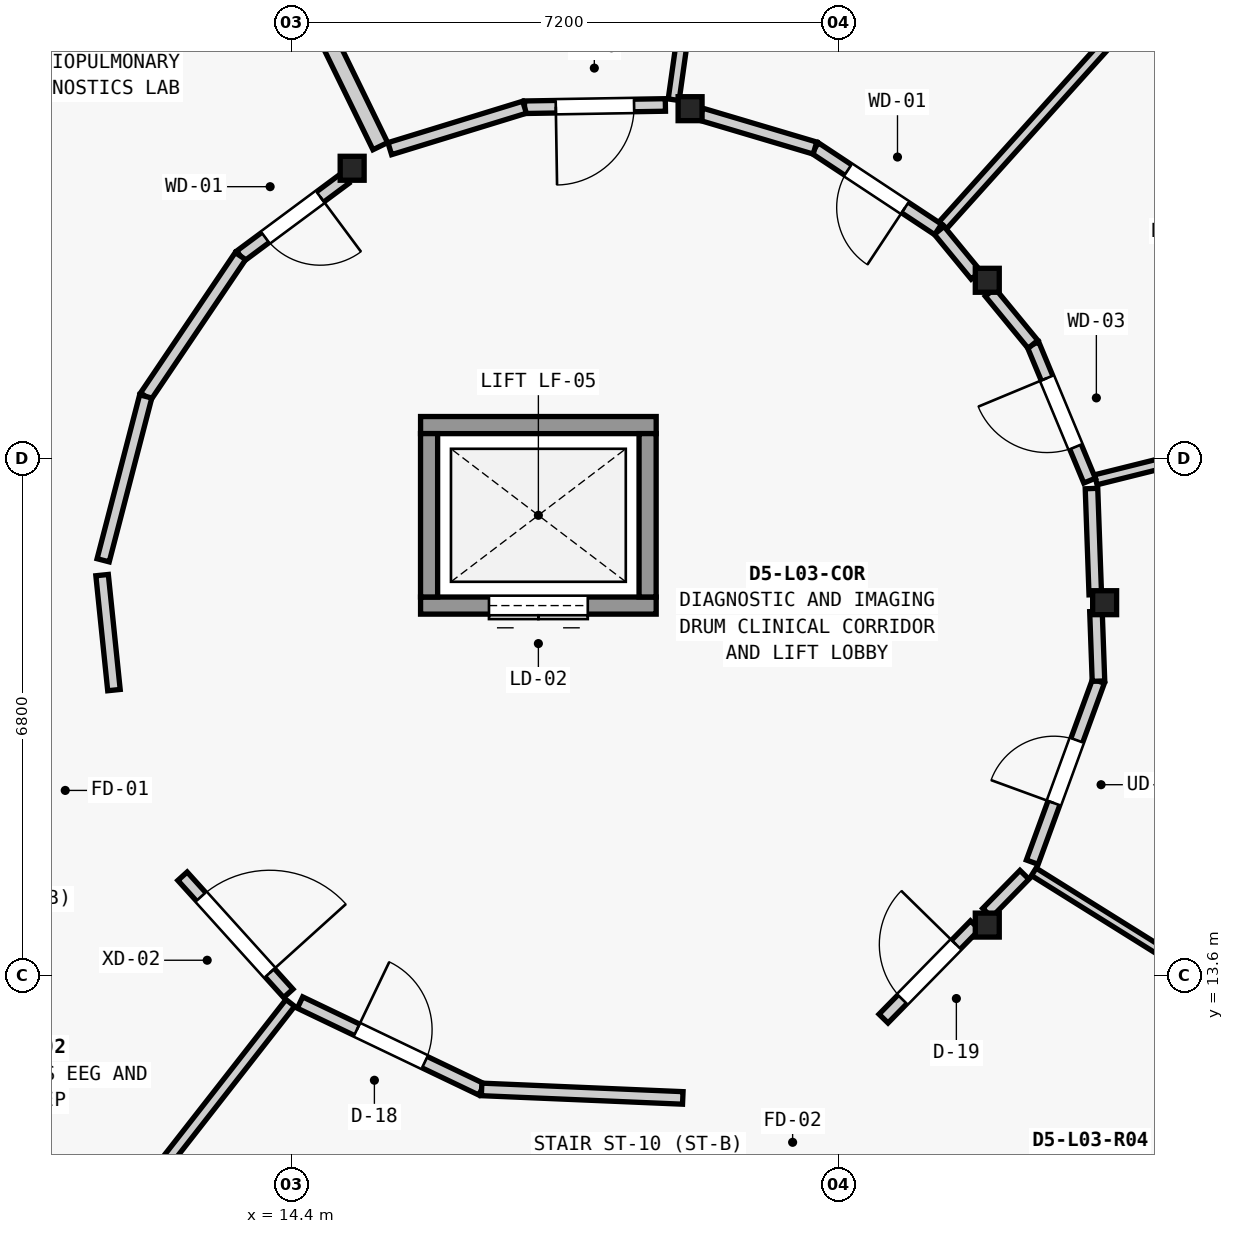
"""IFC4 building model, lengths in metres.
Left out: names, types, materials, properties, quantities, classifications, styles, units other than length and angle.
Written with IfcOpenShell. Run it as: python <this file> out.ifc"""

import sys

from ifc_helpers import new_model, si_unit, direction, frame, frame_2d, origin, origin_2d, place, context, subcontext, project, spatial, rectangle, extrude, element, fill, save


model = new_model("IFC4")
c1 = context("Model", 3, precision=1e-05, world=origin(), true_north=direction((0.0, 1.0)))
c2 = subcontext(c1, "Body", "Model", "MODEL_VIEW")
j1 = project(units=[si_unit("LENGTHUNIT", "METRE"), si_unit("PLANEANGLEUNIT", "RADIAN")], contexts=[c1])
p1 = place(None, origin())
s1 = spatial("IfcSite", under=j1, at=p1, CompositionType="ELEMENT")
p2 = place(p1, origin())
s2 = spatial("IfcBuilding", under=s1, at=p2, CompositionType="ELEMENT")
p3 = place(p2, frame((0.0, 0.0, 12.95)))
s3 = spatial("IfcBuildingStorey", under=s2, at=p3, CompositionType="ELEMENT", Elevation=12.95)
for number, where, z_axis, x_axis in (
    (1, (25.1, 18.5, 0.0), (0.0, 0.0, 1.0), (1.0, 0.0, 0.0)),
    (2, (23.556, 22.742, 0.0), (0.0, 0.0, 1.0), (1.0, 0.0, 0.0)),
    (3, (19.646, 25.0, 0.0), (0.0, 0.0, 1.0), (1.0, 0.0, 0.0)),
    (4, (15.2, 24.216, 0.0), (0.0, 0.0, 1.0), (1.0, 0.0, 0.0)),
    (5, (23.556, 14.258, 0.0), (0.0, 0.0, 1.0), (1.0, 0.0, 0.0)),
):
    element("IfcColumn", number, at=place(p3, frame(where, z_axis=z_axis, x_axis=x_axis)), inside=s3, PredefinedType="COLUMN", context=c2, shape_type="SweptSolid", body=[
        extrude(rectangle(XDim=0.315, YDim=0.315, at=origin_2d()), origin(), (0.0, 0.0, 1.0), 4.2),
    ])
p4 = place(p3, frame((16.1, 18.462, 0.0), z_axis=(0.0, 0.0, 1.0), x_axis=(1.0, 0.0, 0.0)))
e6 = element("IfcWall", 6, at=p4, inside=s3, PredefinedType="SHEAR", context=c2, shape_type="SweptSolid", body=[
    extrude(rectangle(XDim=3.1, YDim=0.225, at=frame_2d((1.55, 0.0))), origin(), (0.0, 0.0, 1.0), 3.995),
])
p5 = place(p4, frame((0.9, 0.0, 0.0)))
e7 = element("IfcOpeningElement", 7, at=p5, cuts=e6, PredefinedType="OPENING", context=c2, shape_type="SweptSolid", body=[
    extrude(rectangle(XDim=1.3, YDim=2.2, at=frame_2d((0.65, 1.1))), frame((0.0, 0.123, 0.0), z_axis=(0.0, -1.0, 0.0), x_axis=(1.0, 0.0, 0.0)), (0.0, 0.0, 1.0), 0.245),
])
p6 = place(p3, frame((16.1, 20.837, 0.0), z_axis=(0.0, 0.0, 1.0), x_axis=(1.0, 0.0, 0.0)))
e8 = element("IfcWall", 8, at=p6, inside=s3, PredefinedType="SHEAR", context=c2, shape_type="SweptSolid", body=[
    extrude(rectangle(XDim=3.1, YDim=0.225, at=frame_2d((1.55, 0.0))), origin(), (0.0, 0.0, 1.0), 3.995),
])
for number, where, z_axis, x_axis in (
    (9, (16.212, 18.575, 0.0), (0.0, 0.0, 1.0), (0.0, 1.0, 0.0)),
    (10, (19.087, 18.575, 0.0), (0.0, 0.0, 1.0), (0.0, 1.0, 0.0)),
):
    element("IfcWall", number, at=place(p3, frame(where, z_axis=z_axis, x_axis=x_axis)), inside=s3, PredefinedType="SHEAR", context=c2, shape_type="SweptSolid", body=[
        extrude(rectangle(XDim=2.15, YDim=0.225, at=frame_2d((1.075, 0.0))), origin(), (0.0, 0.0, 1.0), 3.995),
    ])
p7 = place(p3, frame((15.57, 24.507, 0.0), z_axis=(0.0, 0.0, 1.0), x_axis=(-0.438391683607, 0.898784029533, 0.0)))
e11 = element("IfcWall", 11, at=p7, inside=s3, PredefinedType="SOLIDWALL", context=c2, shape_type="SweptSolid", body=[
    extrude(rectangle(XDim=5.571, YDim=0.215, at=frame_2d((2.785, 0.0))), origin(), (0.0, 0.0, 1.0), 3.324),
])
p8 = place(p3, frame((14.386, 13.234, 0.0), z_axis=(0.0, 0.0, 1.0), x_axis=(-0.615754283542, -0.787938235079, 0.0)))
e12 = element("IfcWall", 12, at=p8, inside=s3, PredefinedType="PARTITIONING", context=c2, shape_type="SweptSolid", body=[
    extrude(rectangle(XDim=5.587, YDim=0.145, at=frame_2d((2.793, 0.0))), origin(), (0.0, 0.0, 1.0), 3.324),
])
p9 = place(p3, frame((24.168, 14.959, 0.0), z_axis=(0.0, 0.0, 1.0), x_axis=(0.847976206066, -0.530034295066, 0.0)))
e13 = element("IfcWall", 13, at=p9, inside=s3, PredefinedType="PARTITIONING", context=c2, shape_type="SweptSolid", body=[
    extrude(rectangle(XDim=5.586, YDim=0.115, at=frame_2d((2.793, 0.0))), origin(), (0.0, 0.0, 1.0), 3.324),
])
p10 = place(p3, frame((24.984, 20.117, 0.0), z_axis=(0.0, 0.0, 1.0), x_axis=(0.970325240459, 0.2418034899, 0.0)))
e14 = element("IfcWall", 14, at=p10, inside=s3, PredefinedType="PLUMBINGWALL", context=c2, shape_type="SweptSolid", body=[
    extrude(rectangle(XDim=5.571, YDim=0.135, at=frame_2d((2.786, 0.0))), origin(), (0.0, 0.0, 1.0), 3.324),
])
p11 = place(p3, frame((22.972, 23.466, 0.0), z_axis=(0.0, 0.0, 1.0), x_axis=(0.669003365604, 0.743259373846, 0.0)))
e15 = element("IfcWall", 15, at=p11, inside=s3, PredefinedType="PLUMBINGWALL", context=c2, shape_type="SweptSolid", body=[
    extrude(rectangle(XDim=5.586, YDim=0.135, at=frame_2d((2.793, 0.0))), origin(), (0.0, 0.0, 1.0), 3.324),
])
p12 = place(p3, frame((19.43, 25.118, 0.0), z_axis=(0.0, 0.0, 1.0), x_axis=(0.139279606871, 0.990253094471, 0.0)))
e16 = element("IfcWall", 16, at=p12, inside=s3, PredefinedType="PARTITIONING", context=c2, shape_type="SweptSolid", body=[
    extrude(rectangle(XDim=5.586, YDim=0.145, at=frame_2d((2.793, 0.0))), origin(), (0.0, 0.0, 1.0), 3.324),
])
p13 = place(p3, frame((15.107, 24.083, 0.0), z_axis=(0.0, 0.0, 1.0), x_axis=(-0.802996920627, -0.595983175487, 0.0)))
e17 = element("IfcWall", 17, at=p13, inside=s3, PredefinedType="PARTITIONING", context=c2, shape_type="SweptSolid", body=[
    extrude(rectangle(XDim=1.715, YDim=0.165, at=frame_2d((0.857, 0.0))), origin(), (0.0, 0.0, 1.0), 3.324),
])
p14 = place(p13, frame((0.407, 0.0, 0.0)))
e18 = element("IfcOpeningElement", 18, at=p14, cuts=e17, PredefinedType="OPENING", context=c2, shape_type="SweptSolid", body=[
    extrude(rectangle(XDim=0.9, YDim=2.1, at=frame_2d((0.45, 1.05))), frame((0.0, 0.093, 0.0), z_axis=(0.0, -1.0, 0.0), x_axis=(1.0, 0.0, 0.0)), (0.0, 0.0, 1.0), 0.185),
])
p15 = place(p3, frame((13.73, 23.061, 0.0), z_axis=(0.0, 0.0, 1.0), x_axis=(-0.559294051813, -0.828969338159, 0.0)))
e19 = element("IfcWall", 19, at=p15, inside=s3, PredefinedType="PARTITIONING", context=c2, shape_type="SweptSolid", body=[
    extrude(rectangle(XDim=2.228, YDim=0.165, at=frame_2d((1.114, 0.0))), origin(), (0.0, 0.0, 1.0), 3.324),
])
p16 = place(p3, frame((12.484, 21.214, 0.0), z_axis=(0.0, 0.0, 1.0), x_axis=(-0.251319689769, -0.967904134475, 0.0)))
e20 = element("IfcWall", 20, at=p16, inside=s3, PredefinedType="PARTITIONING", context=c2, shape_type="SweptSolid", body=[
    extrude(rectangle(XDim=2.228, YDim=0.165, at=frame_2d((1.114, 0.0))), origin(), (0.0, 0.0, 1.0), 3.324),
])
p17 = place(p3, frame((11.91, 18.863, 0.0), z_axis=(0.0, 0.0, 1.0), x_axis=(0.102570557108, -0.994725731453, 0.0)))
e21 = element("IfcWall", 21, at=p17, inside=s3, PredefinedType="PARTITIONING", context=c2, shape_type="SweptSolid", body=[
    extrude(rectangle(XDim=1.521, YDim=0.165, at=frame_2d((0.76, 0.0))), origin(), (0.0, 0.0, 1.0), 3.324),
])
p18 = place(p3, frame((12.968, 14.901, 0.0), z_axis=(0.0, 0.0, 1.0), x_axis=(0.670399039083, -0.742000760374, 0.0)))
e22 = element("IfcWall", 22, at=p18, inside=s3, PredefinedType="PARTITIONING", context=c2, shape_type="SweptSolid", body=[
    extrude(rectangle(XDim=2.076, YDim=0.165, at=frame_2d((1.038, 0.0))), origin(), (0.0, 0.0, 1.0), 3.324),
])
p19 = place(p18, frame((0.363, 0.0, 0.0)))
e23 = element("IfcOpeningElement", 23, at=p19, cuts=e22, PredefinedType="OPENING", context=c2, shape_type="SweptSolid", body=[
    extrude(rectangle(XDim=1.35, YDim=2.22, at=frame_2d((0.675, 1.11))), frame((0.0, 0.093, 0.0), z_axis=(0.0, -1.0, 0.0), x_axis=(1.0, 0.0, 0.0)), (0.0, 0.0, 1.0), 0.185),
])
p20 = place(p3, frame((14.514, 13.239, 0.0), z_axis=(0.0, 0.0, 1.0), x_axis=(0.902071813547, -0.431585962705, 0.0)))
e24 = element("IfcWall", 24, at=p20, inside=s3, PredefinedType="PARTITIONING", context=c2, shape_type="SweptSolid", body=[
    extrude(rectangle(XDim=2.648, YDim=0.165, at=frame_2d((1.324, 0.0))), origin(), (0.0, 0.0, 1.0), 3.324),
])
p21 = place(p20, frame((0.829, 0.0, 0.0)))
e25 = element("IfcOpeningElement", 25, at=p21, cuts=e24, PredefinedType="OPENING", context=c2, shape_type="SweptSolid", body=[
    extrude(rectangle(XDim=0.99, YDim=2.22, at=frame_2d((0.495, 1.11))), frame((0.0, 0.093, 0.0), z_axis=(0.0, -1.0, 0.0), x_axis=(1.0, 0.0, 0.0)), (0.0, 0.0, 1.0), 0.185),
])
p22 = place(p3, frame((16.903, 12.096, 0.0), z_axis=(0.0, 0.0, 1.0), x_axis=(0.99910506135, -0.042297474927, 0.0)))
e26 = element("IfcWall", 26, at=p22, inside=s3, PredefinedType="PARTITIONING", context=c2, shape_type="SweptSolid", body=[
    extrude(rectangle(XDim=2.649, YDim=0.165, at=frame_2d((1.325, 0.0))), origin(), (0.0, 0.0, 1.0), 3.324),
])
p23 = place(p3, frame((22.191, 13.028, 0.0), z_axis=(0.0, 0.0, 1.0), x_axis=(0.699827160014, 0.714312218926, 0.0)))
e27 = element("IfcWall", 27, at=p23, inside=s3, PredefinedType="PARTITIONING", context=c2, shape_type="SweptSolid", body=[
    extrude(rectangle(XDim=1.719, YDim=0.165, at=frame_2d((0.86, 0.0))), origin(), (0.0, 0.0, 1.0), 3.324),
])
p24 = place(p23, frame((0.354, 0.0, 0.0)))
e28 = element("IfcOpeningElement", 28, at=p24, cuts=e27, PredefinedType="OPENING", context=c2, shape_type="SweptSolid", body=[
    extrude(rectangle(XDim=1.01, YDim=2.15, at=frame_2d((0.505, 1.075))), frame((0.0, 0.093, 0.0), z_axis=(0.0, -1.0, 0.0), x_axis=(1.0, 0.0, 0.0)), (0.0, 0.0, 1.0), 0.185),
])
p25 = place(p3, frame((23.555, 14.42, 0.0), z_axis=(0.0, 0.0, 1.0), x_axis=(0.699921466631, 0.714219812487, 0.0)))
e29 = element("IfcWall", 29, at=p25, inside=s3, PredefinedType="PARTITIONING", context=c2, shape_type="SweptSolid", body=[
    extrude(rectangle(XDim=0.7, YDim=0.165, at=frame_2d((0.35, 0.0))), origin(), (0.0, 0.0, 1.0), 3.324),
])
p26 = place(p3, frame((24.148, 15.086, 0.0), z_axis=(0.0, 0.0, 1.0), x_axis=(0.343442799129, 0.939173596161, 0.0)))
e30 = element("IfcWall", 30, at=p26, inside=s3, PredefinedType="PARTITIONING", context=c2, shape_type="SweptSolid", body=[
    extrude(rectangle(XDim=2.536, YDim=0.165, at=frame_2d((1.268, 0.0))), origin(), (0.0, 0.0, 1.0), 3.324),
])
p27 = place(p26, frame((0.828, 0.0, 0.0)))
e31 = element("IfcOpeningElement", 31, at=p27, cuts=e30, PredefinedType="OPENING", context=c2, shape_type="SweptSolid", body=[
    extrude(rectangle(XDim=0.88, YDim=2.1, at=frame_2d((0.44, 1.05))), frame((0.0, 0.093, 0.0), z_axis=(0.0, -1.0, 0.0), x_axis=(1.0, 0.0, 0.0)), (0.0, 0.0, 1.0), 0.185),
])
p28 = place(p3, frame((25.019, 17.468, 0.0), z_axis=(0.0, 0.0, 1.0), x_axis=(-0.0359192981, 0.999354693802, 0.0)))
e32 = element("IfcWall", 32, at=p28, inside=s3, PredefinedType="PARTITIONING", context=c2, shape_type="SweptSolid", body=[
    extrude(rectangle(XDim=0.917, YDim=0.165, at=frame_2d((0.459, 0.0))), origin(), (0.0, 0.0, 1.0), 3.324),
])
p29 = place(p3, frame((24.977, 18.606, 0.0), z_axis=(0.0, 0.0, 1.0), x_axis=(-0.035828677701, 0.999357946811, 0.0)))
e33 = element("IfcWall", 33, at=p29, inside=s3, PredefinedType="PARTITIONING", context=c2, shape_type="SweptSolid", body=[
    extrude(rectangle(XDim=1.397, YDim=0.165, at=frame_2d((0.698, 0.0))), origin(), (0.0, 0.0, 1.0), 3.324),
])
p30 = place(p3, frame((24.902, 20.106, 0.0), z_axis=(0.0, 0.0, 1.0), x_axis=(-0.383758104383, 0.923433656155, 0.0)))
e34 = element("IfcWall", 34, at=p30, inside=s3, PredefinedType="PARTITIONING", context=c2, shape_type="SweptSolid", body=[
    extrude(rectangle(XDim=1.942, YDim=0.165, at=frame_2d((0.971, 0.0))), origin(), (0.0, 0.0, 1.0), 3.324),
])
p31 = place(p30, frame((0.481, 0.0, 0.0)))
e35 = element("IfcOpeningElement", 35, at=p31, cuts=e34, PredefinedType="OPENING", context=c2, shape_type="SweptSolid", body=[
    extrude(rectangle(XDim=0.98, YDim=2.1, at=frame_2d((0.49, 1.05))), frame((0.0, 0.093, 0.0), z_axis=(0.0, -1.0, 0.0), x_axis=(1.0, 0.0, 0.0)), (0.0, 0.0, 1.0), 0.185),
])
p32 = place(p3, frame((24.157, 21.899, 0.0), z_axis=(0.0, 0.0, 1.0), x_axis=(-0.634915552235, 0.772581543612, 0.0)))
e36 = element("IfcWall", 36, at=p32, inside=s3, PredefinedType="PARTITIONING", context=c2, shape_type="SweptSolid", body=[
    extrude(rectangle(XDim=0.887, YDim=0.165, at=frame_2d((0.443, 0.0))), origin(), (0.0, 0.0, 1.0), 3.324),
])
p33 = place(p3, frame((23.408, 22.809, 0.0), z_axis=(0.0, 0.0, 1.0), x_axis=(-0.635012128366, 0.772502166229, 0.0)))
e37 = element("IfcWall", 37, at=p33, inside=s3, PredefinedType="PARTITIONING", context=c2, shape_type="SweptSolid", body=[
    extrude(rectangle(XDim=0.763, YDim=0.165, at=frame_2d((0.382, 0.0))), origin(), (0.0, 0.0, 1.0), 3.324),
])
p34 = place(p3, frame((22.909, 23.411, 0.0), z_axis=(0.0, 0.0, 1.0), x_axis=(-0.834152513301, 0.551533847152, 0.0)))
e38 = element("IfcWall", 38, at=p34, inside=s3, PredefinedType="PARTITIONING", context=c2, shape_type="SweptSolid", body=[
    extrude(rectangle(XDim=1.942, YDim=0.165, at=frame_2d((0.971, 0.0))), origin(), (0.0, 0.0, 1.0), 3.324),
])
p35 = place(p34, frame((0.521, 0.0, 0.0)))
e39 = element("IfcOpeningElement", 39, at=p35, cuts=e38, PredefinedType="OPENING", context=c2, shape_type="SweptSolid", body=[
    extrude(rectangle(XDim=0.9, YDim=2.1, at=frame_2d((0.45, 1.05))), frame((0.0, 0.093, 0.0), z_axis=(0.0, -1.0, 0.0), x_axis=(1.0, 0.0, 0.0)), (0.0, 0.0, 1.0), 0.185),
])
p36 = place(p3, frame((21.289, 24.482, 0.0), z_axis=(0.0, 0.0, 1.0), x_axis=(-0.958588240181, 0.284795691305, 0.0)))
e40 = element("IfcWall", 40, at=p36, inside=s3, PredefinedType="PARTITIONING", context=c2, shape_type="SweptSolid", body=[
    extrude(rectangle(XDim=1.563, YDim=0.165, at=frame_2d((0.781, 0.0))), origin(), (0.0, 0.0, 1.0), 3.324),
])
p37 = place(p3, frame((19.321, 25.049, 0.0), z_axis=(0.0, 0.0, 1.0), x_axis=(-0.999868716198, -0.016203406073, 0.0)))
e41 = element("IfcWall", 41, at=p37, inside=s3, PredefinedType="PARTITIONING", context=c2, shape_type="SweptSolid", body=[
    extrude(rectangle(XDim=1.853, YDim=0.165, at=frame_2d((0.927, 0.0))), origin(), (0.0, 0.0, 1.0), 3.324),
])
p38 = place(p37, frame((0.412, 0.0, 0.0)))
e42 = element("IfcOpeningElement", 42, at=p38, cuts=e41, PredefinedType="OPENING", context=c2, shape_type="SweptSolid", body=[
    extrude(rectangle(XDim=1.03, YDim=2.18, at=frame_2d((0.515, 1.09))), frame((0.0, 0.093, 0.0), z_axis=(0.0, -1.0, 0.0), x_axis=(1.0, 0.0, 0.0)), (0.0, 0.0, 1.0), 0.185),
])
p39 = place(p3, frame((17.468, 25.019, 0.0), z_axis=(0.0, 0.0, 1.0), x_axis=(-0.955870034048, -0.293789853483, 0.0)))
e43 = element("IfcWall", 43, at=p39, inside=s3, PredefinedType="PARTITIONING", context=c2, shape_type="SweptSolid", body=[
    extrude(rectangle(XDim=1.855, YDim=0.165, at=frame_2d((0.927, 0.0))), origin(), (0.0, 0.0, 1.0), 3.324),
])
p40 = place(p5, origin())
e44 = element("IfcDoor", 44, at=p40, inside=s3, OperationType="DOUBLE_DOOR_SLIDING", PredefinedType="DOOR", context=c2, shape_type="SweptSolid", body=[
    extrude(rectangle(XDim=1.3, YDim=2.2, at=frame_2d((0.65, 1.1))), frame((0.0, 0.025, 0.0), z_axis=(0.0, -1.0, 0.0), x_axis=(1.0, 0.0, 0.0)), (0.0, 0.0, 1.0), 0.05),
])
fill(e7, e44)
p41 = place(p14, origin())
e45 = element("IfcDoor", 45, at=p41, inside=s3, OperationType="SINGLE_SWING_LEFT", PredefinedType="DOOR", context=c2, shape_type="SweptSolid", body=[
    extrude(rectangle(XDim=0.9, YDim=2.1, at=frame_2d((0.45, 1.05))), frame((0.0, 0.025, 0.0), z_axis=(0.0, -1.0, 0.0), x_axis=(1.0, 0.0, 0.0)), (0.0, 0.0, 1.0), 0.05),
])
fill(e18, e45)
p42 = place(p19, origin())
e46 = element("IfcDoor", 46, at=p42, inside=s3, OperationType="SINGLE_SWING_RIGHT", PredefinedType="DOOR", context=c2, shape_type="SweptSolid", body=[
    extrude(rectangle(XDim=1.35, YDim=2.22, at=frame_2d((0.675, 1.11))), frame((0.0, 0.025, 0.0), z_axis=(0.0, -1.0, 0.0), x_axis=(1.0, 0.0, 0.0)), (0.0, 0.0, 1.0), 0.05),
])
fill(e23, e46)
p43 = place(p21, origin())
e47 = element("IfcDoor", 47, at=p43, inside=s3, OperationType="SINGLE_SWING_LEFT", PredefinedType="DOOR", context=c2, shape_type="SweptSolid", body=[
    extrude(rectangle(XDim=0.99, YDim=2.22, at=frame_2d((0.495, 1.11))), frame((0.0, 0.025, 0.0), z_axis=(0.0, -1.0, 0.0), x_axis=(1.0, 0.0, 0.0)), (0.0, 0.0, 1.0), 0.05),
])
fill(e25, e47)
p44 = place(p24, origin())
e48 = element("IfcDoor", 48, at=p44, inside=s3, OperationType="SINGLE_SWING_RIGHT", PredefinedType="DOOR", context=c2, shape_type="SweptSolid", body=[
    extrude(rectangle(XDim=1.01, YDim=2.15, at=frame_2d((0.505, 1.075))), frame((0.0, 0.025, 0.0), z_axis=(0.0, -1.0, 0.0), x_axis=(1.0, 0.0, 0.0)), (0.0, 0.0, 1.0), 0.05),
])
fill(e28, e48)
p45 = place(p27, origin())
e49 = element("IfcDoor", 49, at=p45, inside=s3, OperationType="SINGLE_SWING_LEFT", PredefinedType="DOOR", context=c2, shape_type="SweptSolid", body=[
    extrude(rectangle(XDim=0.88, YDim=2.1, at=frame_2d((0.44, 1.05))), frame((0.0, 0.025, 0.0), z_axis=(0.0, -1.0, 0.0), x_axis=(1.0, 0.0, 0.0)), (0.0, 0.0, 1.0), 0.05),
])
fill(e31, e49)
p46 = place(p31, origin())
e50 = element("IfcDoor", 50, at=p46, inside=s3, OperationType="SINGLE_SWING_RIGHT", PredefinedType="DOOR", context=c2, shape_type="SweptSolid", body=[
    extrude(rectangle(XDim=0.98, YDim=2.1, at=frame_2d((0.49, 1.05))), frame((0.0, 0.025, 0.0), z_axis=(0.0, -1.0, 0.0), x_axis=(1.0, 0.0, 0.0)), (0.0, 0.0, 1.0), 0.05),
])
fill(e35, e50)
p47 = place(p35, origin())
e51 = element("IfcDoor", 51, at=p47, inside=s3, OperationType="SINGLE_SWING_LEFT", PredefinedType="DOOR", context=c2, shape_type="SweptSolid", body=[
    extrude(rectangle(XDim=0.9, YDim=2.1, at=frame_2d((0.45, 1.05))), frame((0.0, 0.025, 0.0), z_axis=(0.0, -1.0, 0.0), x_axis=(1.0, 0.0, 0.0)), (0.0, 0.0, 1.0), 0.05),
])
fill(e39, e51)
p48 = place(p38, origin())
e52 = element("IfcDoor", 52, at=p48, inside=s3, OperationType="SINGLE_SWING_RIGHT", PredefinedType="DOOR", context=c2, shape_type="SweptSolid", body=[
    extrude(rectangle(XDim=1.03, YDim=2.18, at=frame_2d((0.515, 1.09))), frame((0.0, 0.025, 0.0), z_axis=(0.0, -1.0, 0.0), x_axis=(1.0, 0.0, 0.0)), (0.0, 0.0, 1.0), 0.05),
])
fill(e42, e52)
save(model, sys.argv[1])
